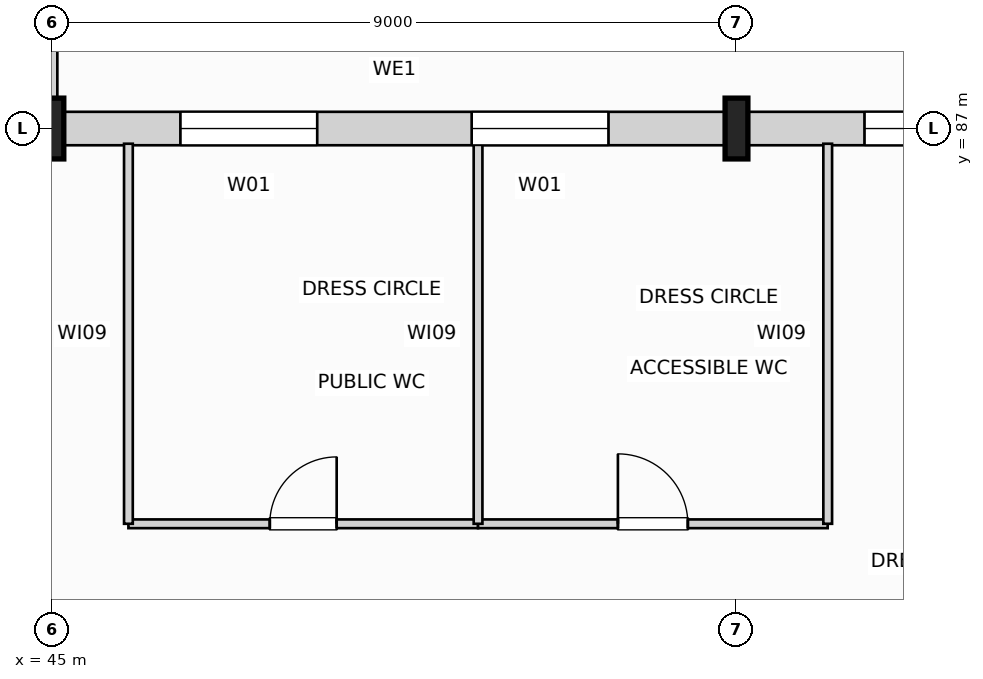
"""IFC4 building model, lengths in metres.
Left out: names, types, materials, properties, quantities, classifications, styles, units other than length and angle.
Written with IfcOpenShell. Run it as: python <this file> out.ifc"""

import sys

from ifc_helpers import new_model, si_unit, direction, frame, frame_2d, origin, origin_2d, place, context, subcontext, project, spatial, rectangle, i_section, extrude, element, fill, save


model = new_model("IFC4")
c1 = context("Model", 3, precision=1e-05, world=origin(), true_north=direction((0.0, 1.0)))
c2 = subcontext(c1, "Body", "Model", "MODEL_VIEW")
j1 = project(units=[si_unit("LENGTHUNIT", "METRE"), si_unit("PLANEANGLEUNIT", "RADIAN")], contexts=[c1])
p1 = place(None, origin())
s1 = spatial("IfcSite", under=j1, at=p1, CompositionType="ELEMENT")
p2 = place(p1, origin())
s2 = spatial("IfcBuilding", under=s1, at=p2, CompositionType="ELEMENT")
p3 = place(p2, frame((0.0, 0.0, 16.8)))
s3 = spatial("IfcBuildingStorey", under=s2, at=p3, CompositionType="ELEMENT", Elevation=16.8)
for number, where, z_axis, x_axis in (
    (1, (45.0, 87.0, 0.0), (0.0, 0.0, 1.0), (1.0, 0.0, 0.0)),
    (2, (54.0, 87.0, 0.0), (0.0, 0.0, 1.0), (1.0, 0.0, 0.0)),
):
    element("IfcColumn", number, at=place(p3, frame(where, z_axis=z_axis, x_axis=x_axis)), inside=s3, PredefinedType="COLUMN", context=c2, shape_type="SweptSolid", body=[
        extrude(i_section(OverallWidth=0.3, OverallDepth=0.8, WebThickness=0.018, FlangeThickness=0.033, at=origin_2d()), origin(), (0.0, 0.0, 1.0), 4.8),
    ])
p4 = place(p3, frame((45.145, 87.0, 0.0), z_axis=(0.0, 0.0, 1.0), x_axis=(1.0, 0.0, 0.0)))
e3 = element("IfcWall", 3, at=p4, inside=s3, PredefinedType="SOLIDWALL", context=c2, shape_type="SweptSolid", body=[
    extrude(rectangle(XDim=8.71, YDim=0.44, at=frame_2d((4.355, 0.0))), origin(), (0.0, 0.0, 1.0), 3.835),
])
p5 = place(p4, frame((1.539, 0.0, 0.85)))
e4 = element("IfcOpeningElement", 4, at=p5, cuts=e3, PredefinedType="OPENING", context=c2, shape_type="SweptSolid", body=[
    extrude(rectangle(XDim=1.8, YDim=2.6, at=frame_2d((0.9, 1.3))), frame((0.0, 0.23, 0.0), z_axis=(0.0, -1.0, 0.0), x_axis=(1.0, 0.0, 0.0)), (0.0, 0.0, 1.0), 0.46),
])
p6 = place(p4, frame((5.371, 0.0, 0.85)))
e5 = element("IfcOpeningElement", 5, at=p6, cuts=e3, PredefinedType="OPENING", context=c2, shape_type="SweptSolid", body=[
    extrude(rectangle(XDim=1.8, YDim=2.6, at=frame_2d((0.9, 1.3))), frame((0.0, 0.23, 0.0), z_axis=(0.0, -1.0, 0.0), x_axis=(1.0, 0.0, 0.0)), (0.0, 0.0, 1.0), 0.46),
])
p7 = place(p3, frame((54.145, 87.0, 0.0), z_axis=(0.0, 0.0, 1.0), x_axis=(1.0, 0.0, 0.0)))
e6 = element("IfcWall", 6, at=p7, inside=s3, PredefinedType="SOLIDWALL", context=c2, shape_type="SweptSolid", body=[
    extrude(rectangle(XDim=8.71, YDim=0.44, at=frame_2d((4.355, 0.0))), origin(), (0.0, 0.0, 1.0), 3.785),
])
p8 = place(p7, frame((1.539, 0.0, 0.85)))
e7 = element("IfcOpeningElement", 7, at=p8, cuts=e6, PredefinedType="OPENING", context=c2, shape_type="SweptSolid", body=[
    extrude(rectangle(XDim=1.8, YDim=2.6, at=frame_2d((0.9, 1.3))), frame((0.0, 0.23, 0.0), z_axis=(0.0, -1.0, 0.0), x_axis=(1.0, 0.0, 0.0)), (0.0, 0.0, 1.0), 0.46),
])
p9 = place(p7, frame((5.371, 0.0, 0.85)))
e8 = element("IfcOpeningElement", 8, at=p9, cuts=e6, PredefinedType="OPENING", context=c2, shape_type="SweptSolid", body=[
    extrude(rectangle(XDim=1.8, YDim=2.6, at=frame_2d((0.9, 1.3))), frame((0.0, 0.23, 0.0), z_axis=(0.0, -1.0, 0.0), x_axis=(1.0, 0.0, 0.0)), (0.0, 0.0, 1.0), 0.46),
])
p10 = place(p3, frame((46.0, 81.8, 0.0), z_axis=(0.0, 0.0, 1.0), x_axis=(1.0, 0.0, 0.0)))
e9 = element("IfcWall", 9, at=p10, inside=s3, PredefinedType="PARTITIONING", context=c2, shape_type="SweptSolid", body=[
    extrude(rectangle(XDim=4.6, YDim=0.115, at=frame_2d((2.3, 0.0))), origin(), (0.0, 0.0, 1.0), 4.485),
])
p11 = place(p10, frame((1.86, 0.0, 0.0)))
e10 = element("IfcOpeningElement", 10, at=p11, cuts=e9, PredefinedType="OPENING", context=c2, shape_type="SweptSolid", body=[
    extrude(rectangle(XDim=0.88, YDim=2.06, at=frame_2d((0.44, 1.03))), frame((0.0, 0.067, 0.0), z_axis=(0.0, -1.0, 0.0), x_axis=(1.0, 0.0, 0.0)), (0.0, 0.0, 1.0), 0.135),
])
p12 = place(p3, frame((50.6, 81.8, 0.0), z_axis=(0.0, 0.0, 1.0), x_axis=(1.0, 0.0, 0.0)))
e11 = element("IfcWall", 11, at=p12, inside=s3, PredefinedType="PARTITIONING", context=c2, shape_type="SweptSolid", body=[
    extrude(rectangle(XDim=4.6, YDim=0.115, at=frame_2d((2.3, 0.0))), origin(), (0.0, 0.0, 1.0), 3.985),
])
p13 = place(p12, frame((1.84, 0.0, 0.0)))
e12 = element("IfcOpeningElement", 12, at=p13, cuts=e11, PredefinedType="OPENING", context=c2, shape_type="SweptSolid", body=[
    extrude(rectangle(XDim=0.92, YDim=2.08, at=frame_2d((0.46, 1.04))), frame((0.0, 0.067, 0.0), z_axis=(0.0, -1.0, 0.0), x_axis=(1.0, 0.0, 0.0)), (0.0, 0.0, 1.0), 0.135),
])
for number, where, z_axis, x_axis in (
    (13, (46.0, 81.8, 0.0), (0.0, 0.0, 1.0), (0.0, 1.0, 0.0)),
    (14, (50.6, 81.8, 0.0), (0.0, 0.0, 1.0), (0.0, 1.0, 0.0)),
):
    element("IfcWall", number, at=place(p3, frame(where, z_axis=z_axis, x_axis=x_axis)), inside=s3, PredefinedType="PARTITIONING", context=c2, shape_type="SweptSolid", body=[
        extrude(rectangle(XDim=5.0, YDim=0.115, at=frame_2d((2.5, 0.0))), origin(), (0.0, 0.0, 1.0), 3.885),
    ])
p14 = place(p3, frame((55.2, 81.8, 0.0), z_axis=(0.0, 0.0, 1.0), x_axis=(0.0, 1.0, 0.0)))
e15 = element("IfcWall", 15, at=p14, inside=s3, PredefinedType="PARTITIONING", context=c2, shape_type="SweptSolid", body=[
    extrude(rectangle(XDim=5.0, YDim=0.115, at=frame_2d((2.5, 0.0))), origin(), (0.0, 0.0, 1.0), 3.935),
])
p15 = place(p3, frame((45.0, 87.2, 0.0), z_axis=(0.0, 0.0, 1.0), x_axis=(0.0, 1.0, 0.0)))
e16 = element("IfcWall", 16, at=p15, inside=s3, PredefinedType="PARTITIONING", context=c2, shape_type="SweptSolid", body=[
    extrude(rectangle(XDim=24.3, YDim=0.13, at=frame_2d((12.15, 0.0))), origin(), (0.0, 0.0, 1.0), 3.835),
])
p16 = place(p15, frame((11.65, 0.0, 0.0)))
e17 = element("IfcOpeningElement", 17, at=p16, cuts=e16, PredefinedType="OPENING", context=c2, shape_type="SweptSolid", body=[
    extrude(rectangle(XDim=1.0, YDim=2.12, at=frame_2d((0.5, 1.06))), frame((0.0, 0.075, 0.0), z_axis=(0.0, -1.0, 0.0), x_axis=(1.0, 0.0, 0.0)), (0.0, 0.0, 1.0), 0.15),
])
p17 = place(p5, origin())
e18 = element("IfcWindow", 18, at=p17, inside=s3, PartitioningType="SINGLE_PANEL", PredefinedType="WINDOW", context=c2, shape_type="SweptSolid", body=[
    extrude(rectangle(XDim=1.8, YDim=2.6, at=frame_2d((0.9, 1.3))), frame((0.0, 0.03, 0.0), z_axis=(0.0, -1.0, 0.0), x_axis=(1.0, 0.0, 0.0)), (0.0, 0.0, 1.0), 0.06),
])
fill(e4, e18)
p18 = place(p6, origin())
e19 = element("IfcWindow", 19, at=p18, inside=s3, PartitioningType="SINGLE_PANEL", PredefinedType="WINDOW", context=c2, shape_type="SweptSolid", body=[
    extrude(rectangle(XDim=1.8, YDim=2.6, at=frame_2d((0.9, 1.3))), frame((0.0, 0.03, 0.0), z_axis=(0.0, -1.0, 0.0), x_axis=(1.0, 0.0, 0.0)), (0.0, 0.0, 1.0), 0.06),
])
fill(e5, e19)
p19 = place(p8, origin())
e20 = element("IfcWindow", 20, at=p19, inside=s3, PartitioningType="SINGLE_PANEL", PredefinedType="WINDOW", context=c2, shape_type="SweptSolid", body=[
    extrude(rectangle(XDim=1.8, YDim=2.6, at=frame_2d((0.9, 1.3))), frame((0.0, 0.03, 0.0), z_axis=(0.0, -1.0, 0.0), x_axis=(1.0, 0.0, 0.0)), (0.0, 0.0, 1.0), 0.06),
])
fill(e7, e20)
p20 = place(p11, origin())
e21 = element("IfcDoor", 21, at=p20, inside=s3, OperationType="SINGLE_SWING_RIGHT", PredefinedType="DOOR", context=c2, shape_type="SweptSolid", body=[
    extrude(rectangle(XDim=0.88, YDim=2.06, at=frame_2d((0.44, 1.03))), frame((0.0, 0.025, 0.0), z_axis=(0.0, -1.0, 0.0), x_axis=(1.0, 0.0, 0.0)), (0.0, 0.0, 1.0), 0.05),
])
fill(e10, e21)
p21 = place(p13, origin())
e22 = element("IfcDoor", 22, at=p21, inside=s3, OperationType="SINGLE_SWING_LEFT", PredefinedType="DOOR", context=c2, shape_type="SweptSolid", body=[
    extrude(rectangle(XDim=0.92, YDim=2.08, at=frame_2d((0.46, 1.04))), frame((0.0, 0.025, 0.0), z_axis=(0.0, -1.0, 0.0), x_axis=(1.0, 0.0, 0.0)), (0.0, 0.0, 1.0), 0.05),
])
fill(e12, e22)
save(model, sys.argv[1])
